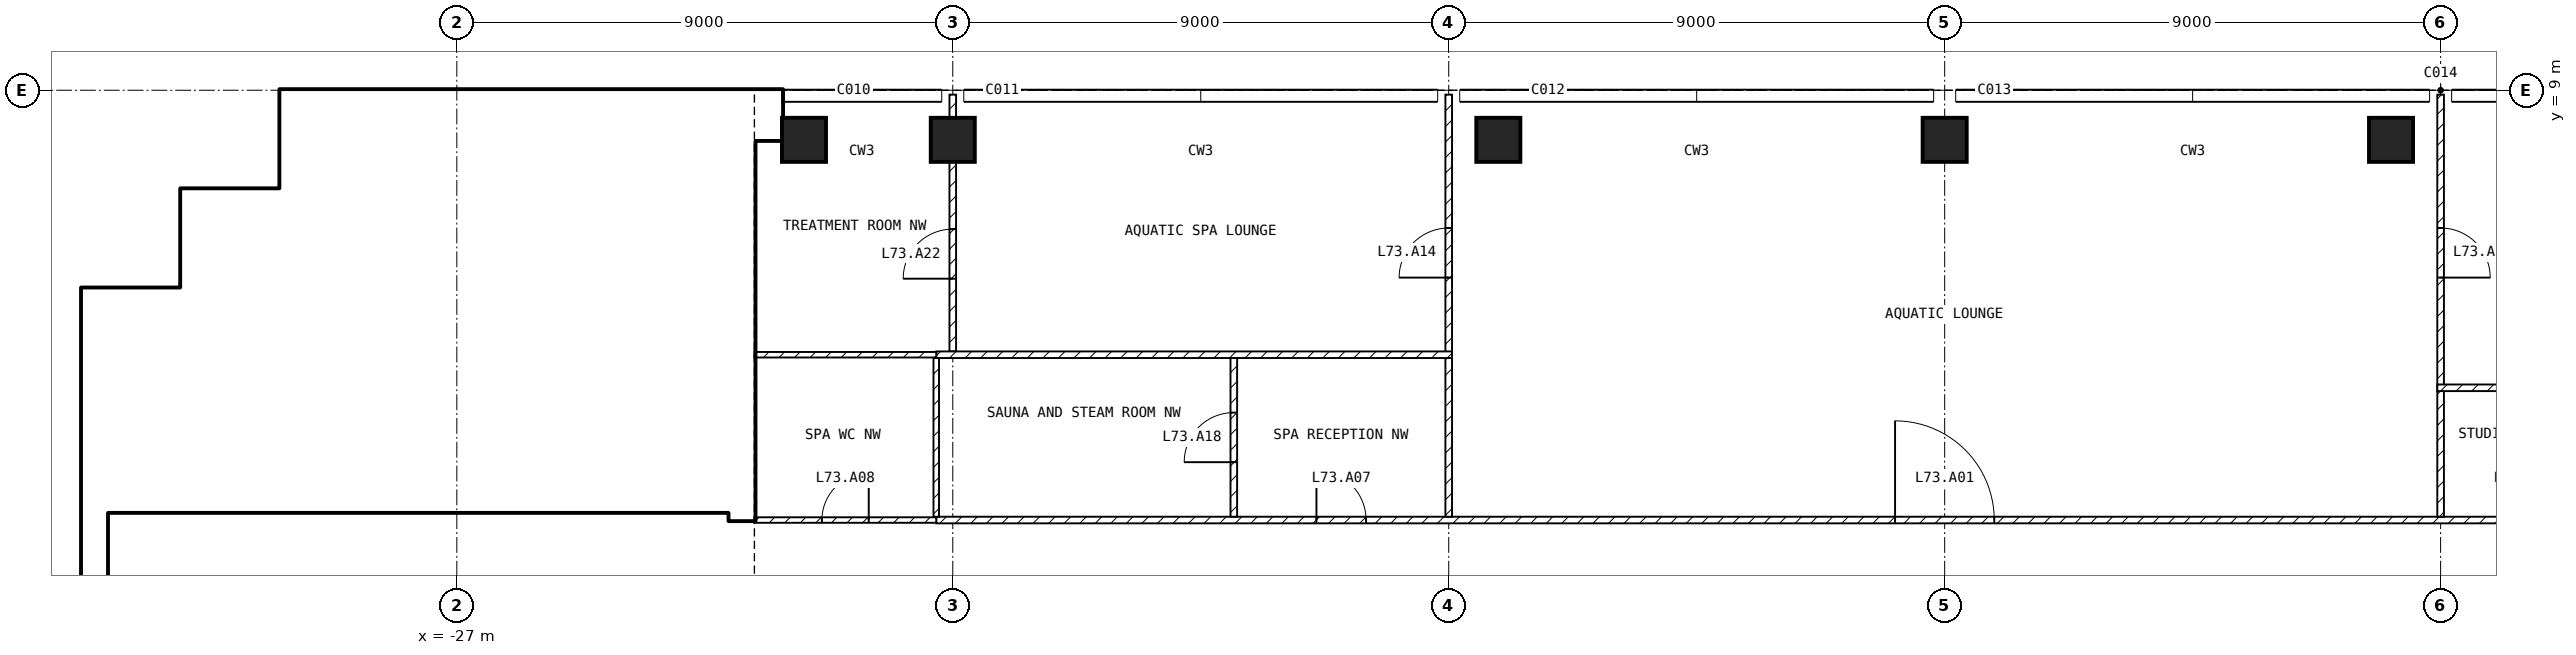
"""IFC4 building model, lengths in metres.
Left out: names, types, materials, properties, quantities, classifications, styles, units other than length and angle.
Written with IfcOpenShell. Run it as: python <this file> out.ifc"""

import sys

from ifc_helpers import new_model, si_unit, direction, frame, frame_2d, origin, origin_2d, place, context, subcontext, project, spatial, rectangle, extrude, element, fill, save


model = new_model("IFC4")
c1 = context("Model", 3, precision=1e-05, world=origin(), true_north=direction((0.0, 1.0)))
c2 = subcontext(c1, "Body", "Model", "MODEL_VIEW")
j1 = project(units=[si_unit("LENGTHUNIT", "METRE"), si_unit("PLANEANGLEUNIT", "RADIAN")], contexts=[c1])
p1 = place(None, origin())
s1 = spatial("IfcSite", under=j1, at=p1, CompositionType="ELEMENT")
p2 = place(p1, origin())
s2 = spatial("IfcBuilding", under=s1, at=p2, CompositionType="ELEMENT")
p3 = place(p2, frame((0.0, 0.0, 285.0)))
s3 = spatial("IfcBuildingStorey", under=s2, at=p3, CompositionType="ELEMENT", Elevation=285.0)
for number, where, z_axis, x_axis in (
    (1, (-20.7, 8.1, -0.3), (0.0, 0.0, 1.0), (1.0, 0.0, 0.0)),
    (2, (-18.0, 8.1, -0.3), (0.0, 0.0, 1.0), (1.0, 0.0, 0.0)),
    (3, (-8.1, 8.1, -0.3), (0.0, 0.0, 1.0), (1.0, 0.0, 0.0)),
    (4, (0.0, 8.1, -0.3), (0.0, 0.0, 1.0), (1.0, 0.0, 0.0)),
    (5, (8.1, 8.1, -0.3), (0.0, 0.0, 1.0), (1.0, 0.0, 0.0)),
):
    element("IfcColumn", number, at=place(p3, frame(where, z_axis=z_axis, x_axis=x_axis)), inside=s3, PredefinedType="COLUMN", context=c2, shape_type="SweptSolid", body=[
        extrude(rectangle(XDim=0.8, YDim=0.8, at=origin_2d()), origin(), (0.0, 0.0, 1.0), 5.45),
    ])
p4 = place(p3, frame((-33.575, -4.95, 0.0), z_axis=(0.0, 0.0, 1.0), x_axis=(0.0, 1.0, 0.0)))
e6 = element("IfcWall", 6, at=p4, inside=s3, PredefinedType="SHEAR", context=c2, shape_type="SweptSolid", body=[
    extrude(rectangle(XDim=10.35, YDim=0.45, at=frame_2d((5.175, 0.0))), origin(), (0.0, 0.0, 1.0), 5.15),
])
for number, where, z_axis, x_axis in (
    (7, (-33.35, 5.175, 0.0), (0.0, 0.0, 1.0), (1.0, 0.0, 0.0)),
    (8, (-31.775, 5.4, 0.0), (0.0, 0.0, 1.0), (0.0, 1.0, 0.0)),
    (9, (-31.55, 6.975, 0.0), (0.0, 0.0, 1.0), (1.0, 0.0, 0.0)),
    (10, (-29.975, 7.2, 0.0), (0.0, 0.0, 1.0), (0.0, 1.0, 0.0)),
):
    element("IfcWall", number, at=place(p3, frame(where, z_axis=z_axis, x_axis=x_axis)), inside=s3, PredefinedType="SHEAR", context=c2, shape_type="SweptSolid", body=[
        extrude(rectangle(XDim=1.8, YDim=0.45, at=frame_2d((0.9, 0.0))), origin(), (0.0, 0.0, 1.0), 5.15),
    ])
p5 = place(p3, frame((-29.75, 8.55, 0.0), z_axis=(0.0, 0.0, 1.0), x_axis=(1.0, 0.0, 0.0)))
e11 = element("IfcWall", 11, at=p5, inside=s3, PredefinedType="SHEAR", context=c2, shape_type="SweptSolid", body=[
    extrude(rectangle(XDim=8.65, YDim=0.9, at=frame_2d((4.325, 0.0))), origin(), (0.0, 0.0, 1.0), 5.15),
])
p6 = place(p3, frame((-21.825, 1.2, 0.0), z_axis=(0.0, 0.0, 1.0), x_axis=(0.0, 1.0, 0.0)))
e12 = element("IfcWall", 12, at=p6, inside=s3, PredefinedType="SHEAR", context=c2, shape_type="SweptSolid", body=[
    extrude(rectangle(XDim=6.9, YDim=0.45, at=frame_2d((3.45, 0.0))), origin(), (0.0, 0.0, 1.0), 5.15),
])
p7 = place(p3, frame((-33.35, 1.45, 0.0), z_axis=(0.0, 0.0, 1.0), x_axis=(1.0, 0.0, 0.0)))
e13 = element("IfcWall", 13, at=p7, inside=s3, PredefinedType="SOLIDWALL", context=c2, shape_type="SweptSolid", body=[
    extrude(rectangle(XDim=11.3, YDim=0.2, at=frame_2d((5.65, 0.0))), origin(), (0.0, 0.0, 1.0), 5.15),
])
p8 = place(p7, frame((9.55, 0.0, 0.0)))
e14 = element("IfcOpeningElement", 14, at=p8, cuts=e13, PredefinedType="OPENING", context=c2, shape_type="SweptSolid", body=[
    extrude(rectangle(XDim=1.0, YDim=2.1, at=frame_2d((0.5, 1.05))), frame((0.0, 0.11, 0.0), z_axis=(0.0, -1.0, 0.0), x_axis=(1.0, 0.0, 0.0)), (0.0, 0.0, 1.0), 0.22),
])
p9 = place(p7, frame((7.05, 0.0, 0.0)))
e15 = element("IfcOpeningElement", 15, at=p9, cuts=e13, PredefinedType="OPENING", context=c2, shape_type="SweptSolid", body=[
    extrude(rectangle(XDim=1.0, YDim=2.1, at=frame_2d((0.5, 1.05))), frame((0.0, 0.11, 0.0), z_axis=(0.0, -1.0, 0.0), x_axis=(1.0, 0.0, 0.0)), (0.0, 0.0, 1.0), 0.22),
])
p10 = place(p7, frame((1.175, 0.0, 0.0)))
e16 = element("IfcOpeningElement", 16, at=p10, cuts=e13, PredefinedType="OPENING", context=c2, shape_type="SweptSolid", body=[
    extrude(rectangle(XDim=0.9, YDim=2.1, at=frame_2d((0.45, 1.05))), frame((0.0, 0.11, 0.0), z_axis=(0.0, -1.0, 0.0), x_axis=(1.0, 0.0, 0.0)), (0.0, 0.0, 1.0), 0.22),
])
p11 = place(p3, frame((-28.35, 5.15, 0.0), z_axis=(0.0, 0.0, 1.0), x_axis=(1.0, 0.0, 0.0)))
e17 = element("IfcWall", 17, at=p11, inside=s3, PredefinedType="SOLIDWALL", context=c2, shape_type="SweptSolid", body=[
    extrude(rectangle(XDim=6.3, YDim=0.2, at=frame_2d((3.15, 0.0))), origin(), (0.0, 0.0, 1.0), 5.15),
])
p12 = place(p11, frame((5.1, 0.0, 0.0)))
e18 = element("IfcOpeningElement", 18, at=p12, cuts=e17, PredefinedType="OPENING", context=c2, shape_type="SweptSolid", body=[
    extrude(rectangle(XDim=1.0, YDim=2.1, at=frame_2d((0.5, 1.05))), frame((0.0, 0.11, 0.0), z_axis=(0.0, -1.0, 0.0), x_axis=(1.0, 0.0, 0.0)), (0.0, 0.0, 1.0), 0.22),
])
p13 = place(p3, frame((-28.25, 5.25, 0.0), z_axis=(0.0, 0.0, 1.0), x_axis=(0.0, 1.0, 0.0)))
e19 = element("IfcWall", 19, at=p13, inside=s3, PredefinedType="SOLIDWALL", context=c2, shape_type="SweptSolid", body=[
    extrude(rectangle(XDim=2.85, YDim=0.2, at=frame_2d((1.425, 0.0))), origin(), (0.0, 0.0, 1.0), 5.15),
])
p14 = place(p3, frame((-33.35, 3.95, 0.0), z_axis=(0.0, 0.0, 1.0), x_axis=(1.0, 0.0, 0.0)))
e20 = element("IfcWall", 20, at=p14, inside=s3, PredefinedType="SOLIDWALL", context=c2, shape_type="SweptSolid", body=[
    extrude(rectangle(XDim=6.15, YDim=0.2, at=frame_2d((3.075, 0.0))), origin(), (0.0, 0.0, 1.0), 5.15),
])
p15 = place(p3, frame((-27.1, 1.55, 0.0), z_axis=(0.0, 0.0, 1.0), x_axis=(0.0, 1.0, 0.0)))
e21 = element("IfcWall", 21, at=p15, inside=s3, PredefinedType="SOLIDWALL", context=c2, shape_type="SweptSolid", body=[
    extrude(rectangle(XDim=3.5, YDim=0.2, at=frame_2d((1.75, 0.0))), origin(), (0.0, 0.0, 1.0), 5.15),
])
p16 = place(p15, frame((0.6, 0.0, 0.0)))
e22 = element("IfcOpeningElement", 22, at=p16, cuts=e21, PredefinedType="OPENING", context=c2, shape_type="SweptSolid", body=[
    extrude(rectangle(XDim=1.1, YDim=2.1, at=frame_2d((0.55, 1.05))), frame((0.0, 0.11, 0.0), z_axis=(0.0, -1.0, 0.0), x_axis=(1.0, 0.0, 0.0)), (0.0, 0.0, 1.0), 0.22),
])
p17 = place(p15, frame((2.6, 0.0, 0.0)))
e23 = element("IfcOpeningElement", 23, at=p17, cuts=e21, PredefinedType="OPENING", context=c2, shape_type="SweptSolid", body=[
    extrude(rectangle(XDim=0.8, YDim=2.1, at=frame_2d((0.4, 1.05))), frame((0.0, 0.11, 0.0), z_axis=(0.0, -1.0, 0.0), x_axis=(1.0, 0.0, 0.0)), (0.0, 0.0, 1.0), 0.22),
])
p18 = place(p3, frame((-30.0, 1.55, 0.0), z_axis=(0.0, 0.0, 1.0), x_axis=(0.0, 1.0, 0.0)))
e24 = element("IfcWall", 24, at=p18, inside=s3, PredefinedType="SOLIDWALL", context=c2, shape_type="SweptSolid", body=[
    extrude(rectangle(XDim=2.3, YDim=0.2, at=frame_2d((1.15, 0.0))), origin(), (0.0, 0.0, 1.0), 5.15),
])
p19 = place(p3, frame((-29.0, 4.05, 0.0), z_axis=(0.0, 0.0, 1.0), x_axis=(0.0, 1.0, 0.0)))
e25 = element("IfcWall", 25, at=p19, inside=s3, PredefinedType="PARTITIONING", context=c2, shape_type="SweptSolid", body=[
    extrude(rectangle(XDim=4.05, YDim=0.15, at=frame_2d((2.025, 0.0))), origin(), (0.0, 0.0, 1.0), 5.15),
])
p20 = place(p19, frame((0.1, 0.0, 0.0)))
e26 = element("IfcOpeningElement", 26, at=p20, cuts=e25, PredefinedType="OPENING", context=c2, shape_type="SweptSolid", body=[
    extrude(rectangle(XDim=0.8, YDim=2.1, at=frame_2d((0.4, 1.05))), frame((0.0, 0.085, 0.0), z_axis=(0.0, -1.0, 0.0), x_axis=(1.0, 0.0, 0.0)), (0.0, 0.0, 1.0), 0.17),
])
p21 = place(p3, frame((-18.3, 1.2, 0.0), z_axis=(0.0, 0.0, 1.0), x_axis=(1.0, 0.0, 0.0)))
e27 = element("IfcWall", 27, at=p21, inside=s3, PredefinedType="PARTITIONING", context=c2, shape_type="SweptSolid", body=[
    extrude(rectangle(XDim=32.7, YDim=0.12, at=frame_2d((16.35, 0.0))), origin(), (0.0, 0.0, 1.0), 5.15),
])
p22 = place(p21, frame((17.4, 0.0, 0.0)))
e28 = element("IfcOpeningElement", 28, at=p22, cuts=e27, PredefinedType="OPENING", context=c2, shape_type="SweptSolid", body=[
    extrude(rectangle(XDim=1.8, YDim=2.1, at=frame_2d((0.9, 1.05))), frame((0.0, 0.07, 0.0), z_axis=(0.0, -1.0, 0.0), x_axis=(1.0, 0.0, 0.0)), (0.0, 0.0, 1.0), 0.14),
])
p23 = place(p21, frame((28.35, 0.0, 0.0)))
e29 = element("IfcOpeningElement", 29, at=p23, cuts=e27, PredefinedType="OPENING", context=c2, shape_type="SweptSolid", body=[
    extrude(rectangle(XDim=0.9, YDim=2.1, at=frame_2d((0.45, 1.05))), frame((0.0, 0.07, 0.0), z_axis=(0.0, -1.0, 0.0), x_axis=(1.0, 0.0, 0.0)), (0.0, 0.0, 1.0), 0.14),
])
p24 = place(p21, frame((6.9, 0.0, 0.0)))
e30 = element("IfcOpeningElement", 30, at=p24, cuts=e27, PredefinedType="OPENING", context=c2, shape_type="SweptSolid", body=[
    extrude(rectangle(XDim=0.9, YDim=2.1, at=frame_2d((0.45, 1.05))), frame((0.0, 0.07, 0.0), z_axis=(0.0, -1.0, 0.0), x_axis=(1.0, 0.0, 0.0)), (0.0, 0.0, 1.0), 0.14),
])
p25 = place(p3, frame((-21.6, 1.2, 0.0), z_axis=(0.0, 0.0, 1.0), x_axis=(1.0, 0.0, 0.0)))
e31 = element("IfcWall", 31, at=p25, inside=s3, PredefinedType="PARTITIONING", context=c2, shape_type="SweptSolid", body=[
    extrude(rectangle(XDim=3.3, YDim=0.1, at=frame_2d((1.65, 0.0))), origin(), (0.0, 0.0, 1.0), 5.15),
])
p26 = place(p25, frame((1.225, 0.0, 0.0)))
e32 = element("IfcOpeningElement", 32, at=p26, cuts=e31, PredefinedType="OPENING", context=c2, shape_type="SweptSolid", body=[
    extrude(rectangle(XDim=0.85, YDim=2.1, at=frame_2d((0.425, 1.05))), frame((0.0, 0.06, 0.0), z_axis=(0.0, -1.0, 0.0), x_axis=(1.0, 0.0, 0.0)), (0.0, 0.0, 1.0), 0.12),
])
p27 = place(p3, frame((9.0, 8.92, 0.0), z_axis=(0.0, 0.0, 1.0), x_axis=(0.0, -1.0, 0.0)))
e33 = element("IfcWall", 33, at=p27, inside=s3, PredefinedType="PARTITIONING", context=c2, shape_type="SweptSolid", body=[
    extrude(rectangle(XDim=7.66, YDim=0.12, at=frame_2d((3.83, 0.0))), origin(), (0.0, 0.0, 1.0), 5.15),
])
p28 = place(p27, frame((2.42, 0.0, 0.0)))
e34 = element("IfcOpeningElement", 34, at=p28, cuts=e33, PredefinedType="OPENING", context=c2, shape_type="SweptSolid", body=[
    extrude(rectangle(XDim=0.9, YDim=2.1, at=frame_2d((0.45, 1.05))), frame((0.0, 0.07, 0.0), z_axis=(0.0, -1.0, 0.0), x_axis=(1.0, 0.0, 0.0)), (0.0, 0.0, 1.0), 0.14),
])
p29 = place(p3, frame((-9.0, 1.26, 0.0), z_axis=(0.0, 0.0, 1.0), x_axis=(0.0, 1.0, 0.0)))
e35 = element("IfcWall", 35, at=p29, inside=s3, PredefinedType="PARTITIONING", context=c2, shape_type="SweptSolid", body=[
    extrude(rectangle(XDim=7.66, YDim=0.12, at=frame_2d((3.83, 0.0))), origin(), (0.0, 0.0, 1.0), 5.15),
])
p30 = place(p29, frame((4.34, 0.0, 0.0)))
e36 = element("IfcOpeningElement", 36, at=p30, cuts=e35, PredefinedType="OPENING", context=c2, shape_type="SweptSolid", body=[
    extrude(rectangle(XDim=0.9, YDim=2.1, at=frame_2d((0.45, 1.05))), frame((0.0, 0.07, 0.0), z_axis=(0.0, -1.0, 0.0), x_axis=(1.0, 0.0, 0.0)), (0.0, 0.0, 1.0), 0.14),
])
p31 = place(p3, frame((14.4, 3.6, 0.0), z_axis=(0.0, 0.0, 1.0), x_axis=(-1.0, 0.0, 0.0)))
e37 = element("IfcWall", 37, at=p31, inside=s3, PredefinedType="PARTITIONING", context=c2, shape_type="SweptSolid", body=[
    extrude(rectangle(XDim=5.46, YDim=0.12, at=frame_2d((2.73, 0.0))), origin(), (0.0, 0.0, 1.0), 5.15),
])
p32 = place(p3, frame((-18.0, 4.26, 0.0), z_axis=(0.0, 0.0, 1.0), x_axis=(0.0, 1.0, 0.0)))
e38 = element("IfcWall", 38, at=p32, inside=s3, PredefinedType="PARTITIONING", context=c2, shape_type="SweptSolid", body=[
    extrude(rectangle(XDim=4.66, YDim=0.12, at=frame_2d((2.33, 0.0))), origin(), (0.0, 0.0, 1.0), 4.396),
])
p33 = place(p32, frame((1.32, 0.0, 0.0)))
e39 = element("IfcOpeningElement", 39, at=p33, cuts=e38, PredefinedType="OPENING", context=c2, shape_type="SweptSolid", body=[
    extrude(rectangle(XDim=0.9, YDim=2.1, at=frame_2d((0.45, 1.05))), frame((0.0, 0.07, 0.0), z_axis=(0.0, -1.0, 0.0), x_axis=(1.0, 0.0, 0.0)), (0.0, 0.0, 1.0), 0.14),
])
p34 = place(p3, frame((-8.94, 4.2, 0.0), z_axis=(0.0, 0.0, 1.0), x_axis=(-1.0, 0.0, 0.0)))
e40 = element("IfcWall", 40, at=p34, inside=s3, PredefinedType="PARTITIONING", context=c2, shape_type="SweptSolid", body=[
    extrude(rectangle(XDim=9.36, YDim=0.12, at=frame_2d((4.68, 0.0))), origin(), (0.0, 0.0, 1.0), 5.15),
])
p35 = place(p3, frame((-18.3, 4.2, 0.0), z_axis=(0.0, 0.0, 1.0), x_axis=(-1.0, 0.0, 0.0)))
e41 = element("IfcWall", 41, at=p35, inside=s3, PredefinedType="PARTITIONING", context=c2, shape_type="SweptSolid", body=[
    extrude(rectangle(XDim=3.3, YDim=0.1, at=frame_2d((1.65, 0.0))), origin(), (0.0, 0.0, 1.0), 5.15),
])
p36 = place(p3, frame((-12.9, 1.26, 0.0), z_axis=(0.0, 0.0, 1.0), x_axis=(0.0, 1.0, 0.0)))
e42 = element("IfcWall", 42, at=p36, inside=s3, PredefinedType="PARTITIONING", context=c2, shape_type="SweptSolid", body=[
    extrude(rectangle(XDim=2.88, YDim=0.12, at=frame_2d((1.44, 0.0))), origin(), (0.0, 0.0, 1.0), 5.15),
])
p37 = place(p36, frame((0.99, 0.0, 0.0)))
e43 = element("IfcOpeningElement", 43, at=p37, cuts=e42, PredefinedType="OPENING", context=c2, shape_type="SweptSolid", body=[
    extrude(rectangle(XDim=0.9, YDim=2.1, at=frame_2d((0.45, 1.05))), frame((0.0, 0.07, 0.0), z_axis=(0.0, -1.0, 0.0), x_axis=(1.0, 0.0, 0.0)), (0.0, 0.0, 1.0), 0.14),
])
p38 = place(p3, frame((-18.3, 1.26, 0.0), z_axis=(0.0, 0.0, 1.0), x_axis=(0.0, 1.0, 0.0)))
e44 = element("IfcWall", 44, at=p38, inside=s3, PredefinedType="PARTITIONING", context=c2, shape_type="SweptSolid", body=[
    extrude(rectangle(XDim=2.88, YDim=0.1, at=frame_2d((1.44, 0.0))), origin(), (0.0, 0.0, 1.0), 5.15),
])
p39 = place(p16, origin())
e45 = element("IfcDoor", 45, at=p39, inside=s3, OperationType="DOUBLE_DOOR_SLIDING", PredefinedType="DOOR", context=c2, shape_type="SweptSolid", body=[
    extrude(rectangle(XDim=1.1, YDim=2.1, at=frame_2d((0.55, 1.05))), frame((0.0, 0.025, 0.0), z_axis=(0.0, -1.0, 0.0), x_axis=(1.0, 0.0, 0.0)), (0.0, 0.0, 1.0), 0.05),
])
fill(e22, e45)
p40 = place(p12, origin())
e46 = element("IfcDoor", 46, at=p40, inside=s3, OperationType="SINGLE_SWING_LEFT", PredefinedType="DOOR", context=c2, shape_type="SweptSolid", body=[
    extrude(rectangle(XDim=1.0, YDim=2.1, at=frame_2d((0.5, 1.05))), frame((0.0, 0.025, 0.0), z_axis=(0.0, -1.0, 0.0), x_axis=(1.0, 0.0, 0.0)), (0.0, 0.0, 1.0), 0.05),
])
fill(e18, e46)
p41 = place(p8, origin())
e47 = element("IfcDoor", 47, at=p41, inside=s3, OperationType="SINGLE_SWING_LEFT", PredefinedType="DOOR", context=c2, shape_type="SweptSolid", body=[
    extrude(rectangle(XDim=1.0, YDim=2.1, at=frame_2d((0.5, 1.05))), frame((0.0, 0.025, 0.0), z_axis=(0.0, -1.0, 0.0), x_axis=(1.0, 0.0, 0.0)), (0.0, 0.0, 1.0), 0.05),
])
fill(e14, e47)
p42 = place(p9, origin())
e48 = element("IfcDoor", 48, at=p42, inside=s3, OperationType="SINGLE_SWING_LEFT", PredefinedType="DOOR", context=c2, shape_type="SweptSolid", body=[
    extrude(rectangle(XDim=1.0, YDim=2.1, at=frame_2d((0.5, 1.05))), frame((0.0, 0.025, 0.0), z_axis=(0.0, -1.0, 0.0), x_axis=(1.0, 0.0, 0.0)), (0.0, 0.0, 1.0), 0.05),
])
fill(e15, e48)
p43 = place(p17, origin())
e49 = element("IfcDoor", 49, at=p43, inside=s3, OperationType="SINGLE_SWING_LEFT", PredefinedType="DOOR", context=c2, shape_type="SweptSolid", body=[
    extrude(rectangle(XDim=0.8, YDim=2.1, at=frame_2d((0.4, 1.05))), frame((0.0, 0.025, 0.0), z_axis=(0.0, -1.0, 0.0), x_axis=(1.0, 0.0, 0.0)), (0.0, 0.0, 1.0), 0.05),
])
fill(e23, e49)
p44 = place(p20, origin())
e50 = element("IfcDoor", 50, at=p44, inside=s3, OperationType="SINGLE_SWING_LEFT", PredefinedType="DOOR", context=c2, shape_type="SweptSolid", body=[
    extrude(rectangle(XDim=0.8, YDim=2.1, at=frame_2d((0.4, 1.05))), frame((0.0, 0.025, 0.0), z_axis=(0.0, -1.0, 0.0), x_axis=(1.0, 0.0, 0.0)), (0.0, 0.0, 1.0), 0.05),
])
fill(e26, e50)
p45 = place(p10, origin())
e51 = element("IfcDoor", 51, at=p45, inside=s3, OperationType="SINGLE_SWING_LEFT", PredefinedType="DOOR", context=c2, shape_type="SweptSolid", body=[
    extrude(rectangle(XDim=0.9, YDim=2.1, at=frame_2d((0.45, 1.05))), frame((0.0, 0.025, 0.0), z_axis=(0.0, -1.0, 0.0), x_axis=(1.0, 0.0, 0.0)), (0.0, 0.0, 1.0), 0.05),
])
fill(e16, e51)
p46 = place(p22, origin())
e52 = element("IfcDoor", 52, at=p46, inside=s3, OperationType="SINGLE_SWING_LEFT", PredefinedType="DOOR", context=c2, shape_type="SweptSolid", body=[
    extrude(rectangle(XDim=1.8, YDim=2.1, at=frame_2d((0.9, 1.05))), frame((0.0, 0.025, 0.0), z_axis=(0.0, -1.0, 0.0), x_axis=(1.0, 0.0, 0.0)), (0.0, 0.0, 1.0), 0.05),
])
fill(e28, e52)
p47 = place(p24, origin())
e53 = element("IfcDoor", 53, at=p47, inside=s3, OperationType="SINGLE_SWING_LEFT", PredefinedType="DOOR", context=c2, shape_type="SweptSolid", body=[
    extrude(rectangle(XDim=0.9, YDim=2.1, at=frame_2d((0.45, 1.05))), frame((0.0, 0.025, 0.0), z_axis=(0.0, -1.0, 0.0), x_axis=(1.0, 0.0, 0.0)), (0.0, 0.0, 1.0), 0.05),
])
fill(e30, e53)
p48 = place(p26, origin())
e54 = element("IfcDoor", 54, at=p48, inside=s3, OperationType="SINGLE_SWING_RIGHT", PredefinedType="DOOR", context=c2, shape_type="SweptSolid", body=[
    extrude(rectangle(XDim=0.85, YDim=2.1, at=frame_2d((0.425, 1.05))), frame((0.0, 0.025, 0.0), z_axis=(0.0, -1.0, 0.0), x_axis=(1.0, 0.0, 0.0)), (0.0, 0.0, 1.0), 0.05),
])
fill(e32, e54)
p49 = place(p30, origin())
e55 = element("IfcDoor", 55, at=p49, inside=s3, OperationType="SINGLE_SWING_LEFT", PredefinedType="DOOR", context=c2, shape_type="SweptSolid", body=[
    extrude(rectangle(XDim=0.9, YDim=2.1, at=frame_2d((0.45, 1.05))), frame((0.0, 0.025, 0.0), z_axis=(0.0, -1.0, 0.0), x_axis=(1.0, 0.0, 0.0)), (0.0, 0.0, 1.0), 0.05),
])
fill(e36, e55)
p50 = place(p28, origin())
e56 = element("IfcDoor", 56, at=p50, inside=s3, OperationType="SINGLE_SWING_RIGHT", PredefinedType="DOOR", context=c2, shape_type="SweptSolid", body=[
    extrude(rectangle(XDim=0.9, YDim=2.1, at=frame_2d((0.45, 1.05))), frame((0.0, 0.025, 0.0), z_axis=(0.0, -1.0, 0.0), x_axis=(1.0, 0.0, 0.0)), (0.0, 0.0, 1.0), 0.05),
])
fill(e34, e56)
p51 = place(p37, origin())
e57 = element("IfcDoor", 57, at=p51, inside=s3, OperationType="SINGLE_SWING_LEFT", PredefinedType="DOOR", context=c2, shape_type="SweptSolid", body=[
    extrude(rectangle(XDim=0.9, YDim=2.1, at=frame_2d((0.45, 1.05))), frame((0.0, 0.025, 0.0), z_axis=(0.0, -1.0, 0.0), x_axis=(1.0, 0.0, 0.0)), (0.0, 0.0, 1.0), 0.05),
])
fill(e43, e57)
p52 = place(p33, origin())
e58 = element("IfcDoor", 58, at=p52, inside=s3, OperationType="SINGLE_SWING_LEFT", PredefinedType="DOOR", context=c2, shape_type="SweptSolid", body=[
    extrude(rectangle(XDim=0.9, YDim=2.1, at=frame_2d((0.45, 1.05))), frame((0.0, 0.025, 0.0), z_axis=(0.0, -1.0, 0.0), x_axis=(1.0, 0.0, 0.0)), (0.0, 0.0, 1.0), 0.05),
])
fill(e39, e58)
save(model, sys.argv[1])
